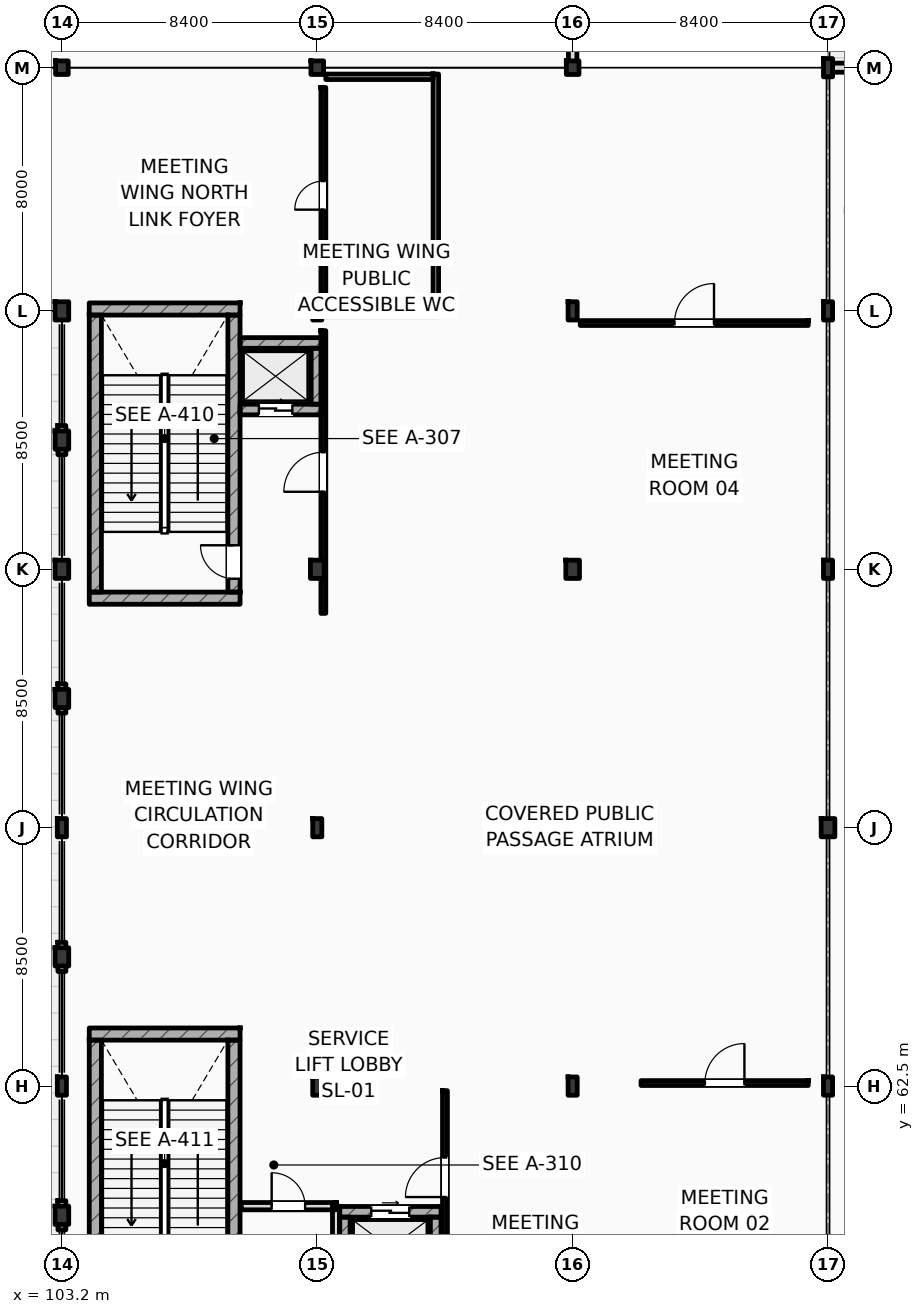
"""IFC4 building model, lengths in metres.
Left out: names, types, materials, properties, quantities, classifications, styles, units other than length and angle.
Written with IfcOpenShell. Run it as: python <this file> out.ifc"""

import sys

from ifc_helpers import new_model, si_unit, direction, frame, frame_2d, origin, origin_2d, place, context, subcontext, project, spatial, rectangle, i_section, extrude, element, fill, save


model = new_model("IFC4")
c1 = context("Model", 3, precision=1e-05, world=origin(), true_north=direction((0.0, 1.0)))
c2 = subcontext(c1, "Body", "Model", "MODEL_VIEW")
j1 = project(units=[si_unit("LENGTHUNIT", "METRE"), si_unit("PLANEANGLEUNIT", "RADIAN")], contexts=[c1])
p1 = place(None, origin())
s1 = spatial("IfcSite", under=j1, at=p1, CompositionType="ELEMENT")
p2 = place(p1, origin())
s2 = spatial("IfcBuilding", under=s1, at=p2, CompositionType="ELEMENT")
p3 = place(p2, origin())
s3 = spatial("IfcBuildingStorey", under=s2, at=p3, CompositionType="ELEMENT", Elevation=0.0)
for number, where, z_axis, x_axis in (
    (1, (103.2, 96.0, 0.0), (0.0, 0.0, 1.0), (1.0, 0.0, 0.0)),
    (2, (111.6, 96.0, 0.0), (0.0, 0.0, 1.0), (1.0, 0.0, 0.0)),
    (3, (120.0, 96.0, 0.0), (0.0, 0.0, 1.0), (1.0, 0.0, 0.0)),
):
    element("IfcColumn", number, at=place(p3, frame(where, z_axis=z_axis, x_axis=x_axis)), inside=s3, PredefinedType="COLUMN", context=c2, shape_type="SweptSolid", body=[
        extrude(i_section(OverallWidth=0.416, OverallDepth=0.446, WebThickness=0.036, FlangeThickness=0.048, FilletRadius=0.015, at=origin_2d()), origin(), (0.0, 0.0, 1.0), 6.0),
    ])
p4 = place(p3, frame((103.2, 88.0, 0.0), z_axis=(0.0, 0.0, 1.0), x_axis=(1.0, 0.0, 0.0)))
e4 = element("IfcColumn", 4, at=p4, inside=s3, PredefinedType="PILASTER", context=c2, shape_type="SweptSolid", body=[
    extrude(rectangle(XDim=0.45, YDim=0.6, at=origin_2d()), origin(), (0.0, 0.0, 1.0), 6.0),
])
for number, where, z_axis, x_axis in (
    (5, (103.2, 62.5, 0.0), (0.0, 0.0, 1.0), (1.0, 0.0, 0.0)),
    (6, (103.2, 71.0, 0.0), (0.0, 0.0, 1.0), (1.0, 0.0, 0.0)),
):
    element("IfcColumn", number, at=place(p3, frame(where, z_axis=z_axis, x_axis=x_axis)), inside=s3, PredefinedType="COLUMN", context=c2, shape_type="SweptSolid", body=[
        extrude(i_section(OverallWidth=0.3, OverallDepth=0.6, WebThickness=0.015, FlangeThickness=0.03, FilletRadius=0.027, at=origin_2d()), origin(), (0.0, 0.0, 1.0), 6.0),
    ])
p5 = place(p3, frame((103.2, 79.5, 0.0), z_axis=(0.0, 0.0, 1.0), x_axis=(1.0, 0.0, 0.0)))
e7 = element("IfcColumn", 7, at=p5, inside=s3, PredefinedType="PILASTER", context=c2, shape_type="SweptSolid", body=[
    extrude(rectangle(XDim=0.45, YDim=0.6, at=origin_2d()), origin(), (0.0, 0.0, 1.0), 6.0),
])
for number, where, z_axis, x_axis in (
    (8, (111.6, 62.5, 0.0), (0.0, 0.0, 1.0), (1.0, 0.0, 0.0)),
    (9, (111.6, 71.0, 0.0), (0.0, 0.0, 1.0), (1.0, 0.0, 0.0)),
):
    element("IfcColumn", number, at=place(p3, frame(where, z_axis=z_axis, x_axis=x_axis)), inside=s3, PredefinedType="COLUMN", context=c2, shape_type="SweptSolid", body=[
        extrude(i_section(OverallWidth=0.3, OverallDepth=0.6, WebThickness=0.015, FlangeThickness=0.03, FilletRadius=0.027, at=origin_2d()), origin(), (0.0, 0.0, 1.0), 6.0),
    ])
p6 = place(p3, frame((111.6, 79.5, 0.0), z_axis=(0.0, 0.0, 1.0), x_axis=(1.0, 0.0, 0.0)))
e10 = element("IfcColumn", 10, at=p6, inside=s3, PredefinedType="PILASTER", context=c2, shape_type="SweptSolid", body=[
    extrude(rectangle(XDim=0.45, YDim=0.6, at=origin_2d()), origin(), (0.0, 0.0, 1.0), 6.0),
])
for number, where, z_axis, x_axis in (
    (11, (111.6, 88.0, 0.0), (0.0, 0.0, 1.0), (1.0, 0.0, 0.0)),
    (12, (120.0, 62.5, 0.0), (0.0, 0.0, 1.0), (1.0, 0.0, 0.0)),
):
    element("IfcColumn", number, at=place(p3, frame(where, z_axis=z_axis, x_axis=x_axis)), inside=s3, PredefinedType="COLUMN", context=c2, shape_type="SweptSolid", body=[
        extrude(i_section(OverallWidth=0.3, OverallDepth=0.6, WebThickness=0.015, FlangeThickness=0.03, FilletRadius=0.027, at=origin_2d()), origin(), (0.0, 0.0, 1.0), 6.0),
    ])
p7 = place(p3, frame((120.0, 79.5, 0.0), z_axis=(0.0, 0.0, 1.0), x_axis=(1.0, 0.0, 0.0)))
e13 = element("IfcColumn", 13, at=p7, inside=s3, PredefinedType="PILASTER", context=c2, shape_type="SweptSolid", body=[
    extrude(rectangle(XDim=0.45, YDim=0.6, at=origin_2d()), origin(), (0.0, 0.0, 1.0), 6.0),
])
for number, where, z_axis, x_axis in (
    (14, (120.0, 88.0, 0.0), (0.0, 0.0, 1.0), (1.0, 0.0, 0.0)),
    (15, (128.4, 62.5, 0.0), (0.0, 0.0, 1.0), (1.0, 0.0, 0.0)),
):
    element("IfcColumn", number, at=place(p3, frame(where, z_axis=z_axis, x_axis=x_axis)), inside=s3, PredefinedType="COLUMN", context=c2, shape_type="SweptSolid", body=[
        extrude(i_section(OverallWidth=0.3, OverallDepth=0.6, WebThickness=0.015, FlangeThickness=0.03, FilletRadius=0.027, at=origin_2d()), origin(), (0.0, 0.0, 1.0), 6.0),
    ])
p8 = place(p3, frame((128.4, 71.0, 0.0), z_axis=(0.0, 0.0, 1.0), x_axis=(1.0, 0.0, 0.0)))
e16 = element("IfcColumn", 16, at=p8, inside=s3, PredefinedType="PILASTER", context=c2, shape_type="SweptSolid", body=[
    extrude(rectangle(XDim=0.45, YDim=0.6, at=origin_2d()), origin(), (0.0, 0.0, 1.0), 6.0),
])
for number, where, z_axis, x_axis in (
    (17, (128.4, 79.5, 0.0), (0.0, 0.0, 1.0), (1.0, 0.0, 0.0)),
    (18, (128.4, 88.0, 0.0), (0.0, 0.0, 1.0), (1.0, 0.0, 0.0)),
    (19, (128.4, 96.0, 0.0), (0.0, 0.0, 1.0), (1.0, 0.0, 0.0)),
):
    element("IfcColumn", number, at=place(p3, frame(where, z_axis=z_axis, x_axis=x_axis)), inside=s3, PredefinedType="COLUMN", context=c2, shape_type="SweptSolid", body=[
        extrude(i_section(OverallWidth=0.3, OverallDepth=0.6, WebThickness=0.015, FlangeThickness=0.03, FilletRadius=0.027, at=origin_2d()), origin(), (0.0, 0.0, 1.0), 6.0),
    ])
for number, where, z_axis, x_axis in (
    (20, (103.2, 58.25, 0.0), (0.0, 0.0, 1.0), (1.0, 0.0, 0.0)),
    (21, (103.2, 66.75, 0.0), (0.0, 0.0, 1.0), (1.0, 0.0, 0.0)),
    (22, (103.2, 75.25, 0.0), (0.0, 0.0, 1.0), (1.0, 0.0, 0.0)),
    (23, (103.2, 83.75, 0.0), (0.0, 0.0, 1.0), (1.0, 0.0, 0.0)),
):
    element("IfcColumn", number, at=place(p3, frame(where, z_axis=z_axis, x_axis=x_axis)), inside=s3, PredefinedType="PILASTER", context=c2, shape_type="SweptSolid", body=[
        extrude(rectangle(XDim=0.45, YDim=0.6, at=origin_2d()), origin(), (0.0, 0.0, 1.0), 6.0),
    ])
for number, where, z_axis, x_axis in (
    (24, (104.1, 88.062, 0.0), (0.0, 0.0, 1.0), (1.0, 0.0, 0.0)),
    (25, (104.1, 78.55, 0.0), (0.0, 0.0, 1.0), (1.0, 0.0, 0.0)),
):
    element("IfcWall", number, at=place(p3, frame(where, z_axis=z_axis, x_axis=x_axis)), inside=s3, PredefinedType="SHEAR", context=c2, shape_type="SweptSolid", body=[
        extrude(rectangle(XDim=4.96, YDim=0.4, at=frame_2d((2.48, 0.0))), origin(), (0.0, 0.0, 1.0), 6.0),
    ])
p9 = place(p3, frame((104.3, 78.75, 0.0), z_axis=(0.0, 0.0, 1.0), x_axis=(0.0, 1.0, 0.0)))
e26 = element("IfcWall", 26, at=p9, inside=s3, PredefinedType="SHEAR", context=c2, shape_type="SweptSolid", body=[
    extrude(rectangle(XDim=9.112, YDim=0.4, at=frame_2d((4.556, 0.0))), origin(), (0.0, 0.0, 1.0), 6.0),
])
p10 = place(p3, frame((108.86, 78.75, 0.0), z_axis=(0.0, 0.0, 1.0), x_axis=(0.0, 1.0, 0.0)))
e27 = element("IfcWall", 27, at=p10, inside=s3, PredefinedType="SHEAR", context=c2, shape_type="SweptSolid", body=[
    extrude(rectangle(XDim=9.112, YDim=0.4, at=frame_2d((4.556, 0.0))), origin(), (0.0, 0.0, 1.0), 6.0),
])
p11 = place(p10, frame((0.44, 0.0, 0.0)))
e28 = element("IfcOpeningElement", 28, at=p11, cuts=e27, PredefinedType="OPENING", context=c2, shape_type="SweptSolid", body=[
    extrude(rectangle(XDim=1.1, YDim=2.2, at=frame_2d((0.55, 1.1))), frame((0.0, 0.21, 0.0), z_axis=(0.0, -1.0, 0.0), x_axis=(1.0, 0.0, 0.0)), (0.0, 0.0, 1.0), 0.42),
])
p12 = place(p3, frame((104.1, 64.212, 0.0), z_axis=(0.0, 0.0, 1.0), x_axis=(1.0, 0.0, 0.0)))
e29 = element("IfcWall", 29, at=p12, inside=s3, PredefinedType="SHEAR", context=c2, shape_type="SweptSolid", body=[
    extrude(rectangle(XDim=4.96, YDim=0.4, at=frame_2d((2.48, 0.0))), origin(), (0.0, 0.0, 1.0), 6.0),
])
p13 = place(p3, frame((104.3, 54.9, 0.0), z_axis=(0.0, 0.0, 1.0), x_axis=(0.0, 1.0, 0.0)))
e30 = element("IfcWall", 30, at=p13, inside=s3, PredefinedType="SHEAR", context=c2, shape_type="SweptSolid", body=[
    extrude(rectangle(XDim=9.112, YDim=0.4, at=frame_2d((4.556, 0.0))), origin(), (0.0, 0.0, 1.0), 6.0),
])
p14 = place(p3, frame((108.86, 54.9, 0.0), z_axis=(0.0, 0.0, 1.0), x_axis=(0.0, 1.0, 0.0)))
e31 = element("IfcWall", 31, at=p14, inside=s3, PredefinedType="SHEAR", context=c2, shape_type="SweptSolid", body=[
    extrude(rectangle(XDim=9.112, YDim=0.4, at=frame_2d((4.556, 0.0))), origin(), (0.0, 0.0, 1.0), 6.0),
])
p15 = place(p14, frame((0.44, 0.0, 0.0)))
e32 = element("IfcOpeningElement", 32, at=p15, cuts=e31, PredefinedType="OPENING", context=c2, shape_type="SweptSolid", body=[
    extrude(rectangle(XDim=1.1, YDim=2.2, at=frame_2d((0.55, 1.1))), frame((0.0, 0.21, 0.0), z_axis=(0.0, -1.0, 0.0), x_axis=(1.0, 0.0, 0.0)), (0.0, 0.0, 1.0), 0.42),
])
p16 = place(p3, frame((128.4, 96.0, 0.0), z_axis=(0.0, 0.0, 1.0), x_axis=(1.0, 0.0, 0.0)))
e33 = element("IfcWall", 33, at=p16, inside=s3, PredefinedType="STANDARD", context=c2, shape_type="SweptSolid", body=[
    extrude(rectangle(XDim=9.0, YDim=0.3, at=frame_2d((4.5, 0.0))), origin(), (0.0, 0.0, 1.0), 5.09),
])
p17 = place(p16, frame((3.3, 0.0, 0.0)))
e34 = element("IfcOpeningElement", 34, at=p17, cuts=e33, PredefinedType="OPENING", context=c2, shape_type="SweptSolid", body=[
    extrude(rectangle(XDim=2.4, YDim=2.6, at=frame_2d((1.2, 1.3))), frame((0.0, 0.16, 0.0), z_axis=(0.0, -1.0, 0.0), x_axis=(1.0, 0.0, 0.0)), (0.0, 0.0, 1.0), 0.32),
])
for number, where, z_axis, x_axis in (
    (35, (103.2, 57.77, 0.0), (0.0, 0.0, 1.0), (0.0, 1.0, 0.0)),
    (36, (103.2, 66.27, 0.0), (0.0, 0.0, 1.0), (0.0, 1.0, 0.0)),
    (37, (103.2, 74.77, 0.0), (0.0, 0.0, 1.0), (0.0, 1.0, 0.0)),
    (38, (103.2, 83.27, 0.0), (0.0, 0.0, 1.0), (0.0, 1.0, 0.0)),
):
    element("IfcWall", number, at=place(p3, frame(where, z_axis=z_axis, x_axis=x_axis)), inside=s3, PredefinedType="STANDARD", context=c2, shape_type="SweptSolid", body=[
        extrude(rectangle(XDim=0.96, YDim=0.26, at=frame_2d((0.48, 0.0))), origin(), (0.0, 0.0, 1.0), 5.2),
    ])
p18 = place(p3, frame((120.0, 96.0, 0.0), z_axis=(0.0, 0.0, 1.0), x_axis=(0.0, 1.0, 0.0)))
e39 = element("IfcWall", 39, at=p18, inside=s3, PredefinedType="STANDARD", context=c2, shape_type="SweptSolid", body=[
    extrude(rectangle(XDim=22.0, YDim=0.28, at=frame_2d((11.0, 0.0))), origin(), (0.0, 0.0, 1.0), 5.24),
])
p19 = place(p3, frame((109.06, 86.945, 0.0), z_axis=(0.0, 0.0, 1.0), x_axis=(1.0, 0.0, 0.0)))
e40 = element("IfcWall", 40, at=p19, inside=s3, PredefinedType="SHEAR", context=c2, shape_type="SweptSolid", body=[
    extrude(rectangle(XDim=2.69, YDim=0.35, at=frame_2d((1.345, 0.0))), origin(), (0.0, 0.0, 1.0), 5.7),
])
p20 = place(p3, frame((109.06, 84.755, 0.0), z_axis=(0.0, 0.0, 1.0), x_axis=(1.0, 0.0, 0.0)))
e41 = element("IfcWall", 41, at=p20, inside=s3, PredefinedType="SHEAR", context=c2, shape_type="SweptSolid", body=[
    extrude(rectangle(XDim=2.69, YDim=0.35, at=frame_2d((1.345, 0.0))), origin(), (0.0, 0.0, 1.0), 5.7),
])
p21 = place(p20, frame((0.62, 0.0, 0.0)))
e42 = element("IfcOpeningElement", 42, at=p21, cuts=e41, PredefinedType="OPENING", context=c2, shape_type="SweptSolid", body=[
    extrude(rectangle(XDim=1.1, YDim=2.2, at=frame_2d((0.55, 1.1))), frame((0.0, 0.185, 0.0), z_axis=(0.0, -1.0, 0.0), x_axis=(1.0, 0.0, 0.0)), (0.0, 0.0, 1.0), 0.37),
])
p22 = place(p3, frame((111.575, 84.93, 0.0), z_axis=(0.0, 0.0, 1.0), x_axis=(0.0, 1.0, 0.0)))
e43 = element("IfcWall", 43, at=p22, inside=s3, PredefinedType="SHEAR", context=c2, shape_type="SweptSolid", body=[
    extrude(rectangle(XDim=1.84, YDim=0.35, at=frame_2d((0.92, 0.0))), origin(), (0.0, 0.0, 1.0), 5.2),
])
p23 = place(p3, frame((112.33, 58.365, 0.0), z_axis=(0.0, 0.0, 1.0), x_axis=(1.0, 0.0, 0.0)))
e44 = element("IfcWall", 44, at=p23, inside=s3, PredefinedType="SHEAR", context=c2, shape_type="SweptSolid", body=[
    extrude(rectangle(XDim=3.34, YDim=0.35, at=frame_2d((1.67, 0.0))), origin(), (0.0, 0.0, 1.0), 5.7),
])
p24 = place(p23, frame((1.045, 0.0, 0.0)))
e45 = element("IfcOpeningElement", 45, at=p24, cuts=e44, PredefinedType="OPENING", context=c2, shape_type="SweptSolid", body=[
    extrude(rectangle(XDim=1.25, YDim=2.25, at=frame_2d((0.625, 1.125))), frame((0.0, 0.185, 0.0), z_axis=(0.0, -1.0, 0.0), x_axis=(1.0, 0.0, 0.0)), (0.0, 0.0, 1.0), 0.37),
])
for number, where, z_axis, x_axis in (
    (46, (112.505, 56.15, 0.0), (0.0, 0.0, 1.0), (0.0, 1.0, 0.0)),
    (47, (115.495, 56.15, 0.0), (0.0, 0.0, 1.0), (0.0, 1.0, 0.0)),
):
    element("IfcWall", number, at=place(p3, frame(where, z_axis=z_axis, x_axis=x_axis)), inside=s3, PredefinedType="SHEAR", context=c2, shape_type="SweptSolid", body=[
        extrude(rectangle(XDim=2.04, YDim=0.35, at=frame_2d((1.02, 0.0))), origin(), (0.0, 0.0, 1.0), 5.7),
    ])
p25 = place(p3, frame((115.8, 54.65, 0.0), z_axis=(0.0, 0.0, 1.0), x_axis=(0.0, 1.0, 0.0)))
e48 = element("IfcWall", 48, at=p25, inside=s3, PredefinedType="PARTITIONING", context=c2, shape_type="SweptSolid", body=[
    extrude(rectangle(XDim=7.7, YDim=0.16, at=frame_2d((3.85, 0.0))), origin(), (0.0, 0.0, 1.0), 5.7),
])
p26 = place(p25, frame((4.2, 0.0, 0.0)))
e49 = element("IfcOpeningElement", 49, at=p26, cuts=e48, PredefinedType="OPENING", context=c2, shape_type="SweptSolid", body=[
    extrude(rectangle(XDim=1.3, YDim=2.2, at=frame_2d((0.65, 1.1))), frame((0.0, 0.09, 0.0), z_axis=(0.0, -1.0, 0.0), x_axis=(1.0, 0.0, 0.0)), (0.0, 0.0, 1.0), 0.18),
])
p27 = place(p3, frame((122.25, 62.6, 0.0), z_axis=(0.0, 0.0, 1.0), x_axis=(1.0, 0.0, 0.0)))
e50 = element("IfcWall", 50, at=p27, inside=s3, PredefinedType="PARTITIONING", context=c2, shape_type="SweptSolid", body=[
    extrude(rectangle(XDim=5.5, YDim=0.16, at=frame_2d((2.75, 0.0))), origin(), (0.0, 0.0, 1.0), 5.14),
])
p28 = place(p27, frame((2.1, 0.0, 0.0)))
e51 = element("IfcOpeningElement", 51, at=p28, cuts=e50, PredefinedType="OPENING", context=c2, shape_type="SweptSolid", body=[
    extrude(rectangle(XDim=1.3, YDim=2.2, at=frame_2d((0.65, 1.1))), frame((0.0, 0.09, 0.0), z_axis=(0.0, -1.0, 0.0), x_axis=(1.0, 0.0, 0.0)), (0.0, 0.0, 1.0), 0.18),
])
p29 = place(p3, frame((111.8, 78.05, 0.0), z_axis=(0.0, 0.0, 1.0), x_axis=(0.0, 1.0, 0.0)))
e52 = element("IfcWall", 52, at=p29, inside=s3, PredefinedType="PARTITIONING", context=c2, shape_type="SweptSolid", body=[
    extrude(rectangle(XDim=9.3, YDim=0.16, at=frame_2d((4.65, 0.0))), origin(), (0.0, 0.0, 1.0), 5.2),
])
p30 = place(p29, frame((4.0, 0.0, 0.0)))
e53 = element("IfcOpeningElement", 53, at=p30, cuts=e52, PredefinedType="OPENING", context=c2, shape_type="SweptSolid", body=[
    extrude(rectangle(XDim=1.3, YDim=2.2, at=frame_2d((0.65, 1.1))), frame((0.0, 0.09, 0.0), z_axis=(0.0, -1.0, 0.0), x_axis=(1.0, 0.0, 0.0)), (0.0, 0.0, 1.0), 0.18),
])
p31 = place(p3, frame((120.25, 87.6, 0.0), z_axis=(0.0, 0.0, 1.0), x_axis=(1.0, 0.0, 0.0)))
e54 = element("IfcWall", 54, at=p31, inside=s3, PredefinedType="PARTITIONING", context=c2, shape_type="SweptSolid", body=[
    extrude(rectangle(XDim=7.5, YDim=0.16, at=frame_2d((3.75, 0.0))), origin(), (0.0, 0.0, 1.0), 5.7),
])
p32 = place(p31, frame((3.1, 0.0, 0.0)))
e55 = element("IfcOpeningElement", 55, at=p32, cuts=e54, PredefinedType="OPENING", context=c2, shape_type="SweptSolid", body=[
    extrude(rectangle(XDim=1.3, YDim=2.2, at=frame_2d((0.65, 1.1))), frame((0.0, 0.09, 0.0), z_axis=(0.0, -1.0, 0.0), x_axis=(1.0, 0.0, 0.0)), (0.0, 0.0, 1.0), 0.18),
])
p33 = place(p3, frame((111.8, 88.25, 0.0), z_axis=(0.0, 0.0, 1.0), x_axis=(0.0, 1.0, 0.0)))
e56 = element("IfcWall", 56, at=p33, inside=s3, PredefinedType="PARTITIONING", context=c2, shape_type="SweptSolid", body=[
    extrude(rectangle(XDim=7.1, YDim=0.16, at=frame_2d((3.55, 0.0))), origin(), (0.0, 0.0, 1.0), 5.24),
])
p34 = place(p33, frame((3.08, 0.0, 0.0)))
e57 = element("IfcOpeningElement", 57, at=p34, cuts=e56, PredefinedType="OPENING", context=c2, shape_type="SweptSolid", body=[
    extrude(rectangle(XDim=0.94, YDim=2.15, at=frame_2d((0.47, 1.075))), frame((0.0, 0.09, 0.0), z_axis=(0.0, -1.0, 0.0), x_axis=(1.0, 0.0, 0.0)), (0.0, 0.0, 1.0), 0.18),
])
p35 = place(p3, frame((111.88, 87.9, 0.0), z_axis=(0.0, 0.0, 1.0), x_axis=(1.0, 0.0, 0.0)))
e58 = element("IfcWall", 58, at=p35, inside=s3, PredefinedType="PARTITIONING", context=c2, shape_type="SweptSolid", body=[
    extrude(rectangle(XDim=3.53, YDim=0.18, at=frame_2d((1.765, 0.0))), origin(), (0.0, 0.0, 1.0), 5.14),
])
p36 = place(p3, frame((115.5, 87.81, 0.0), z_axis=(0.0, 0.0, 1.0), x_axis=(0.0, 1.0, 0.0)))
e59 = element("IfcWall", 59, at=p36, inside=s3, PredefinedType="PARTITIONING", context=c2, shape_type="SweptSolid", body=[
    extrude(rectangle(XDim=7.98, YDim=0.18, at=frame_2d((3.99, 0.0))), origin(), (0.0, 0.0, 1.0), 5.7),
])
p37 = place(p3, frame((111.88, 95.7, 0.0), z_axis=(0.0, 0.0, 1.0), x_axis=(1.0, 0.0, 0.0)))
e60 = element("IfcWall", 60, at=p37, inside=s3, PredefinedType="PARTITIONING", context=c2, shape_type="SweptSolid", body=[
    extrude(rectangle(XDim=3.53, YDim=0.18, at=frame_2d((1.765, 0.0))), origin(), (0.0, 0.0, 1.0), 5.7),
])
p38 = place(p3, frame((112.22, 54.22, 0.0), z_axis=(0.0, 0.0, 1.0), x_axis=(0.0, 1.0, 0.0)))
e61 = element("IfcWall", 61, at=p38, inside=s3, PredefinedType="STANDARD", context=c2, shape_type="SweptSolid", body=[
    extrude(rectangle(XDim=4.33, YDim=0.24, at=frame_2d((2.165, 0.0))), origin(), (0.0, 0.0, 1.0), 5.7),
])
p39 = place(p3, frame((109.1, 58.55, 0.0), z_axis=(0.0, 0.0, 1.0), x_axis=(1.0, 0.0, 0.0)))
e62 = element("IfcWall", 62, at=p39, inside=s3, PredefinedType="STANDARD", context=c2, shape_type="SweptSolid", body=[
    extrude(rectangle(XDim=3.12, YDim=0.24, at=frame_2d((1.56, 0.0))), origin(), (0.0, 0.0, 1.0), 5.7),
])
p40 = place(p39, frame((1.0, 0.0, 0.0)))
e63 = element("IfcOpeningElement", 63, at=p40, cuts=e62, PredefinedType="OPENING", context=c2, shape_type="SweptSolid", body=[
    extrude(rectangle(XDim=1.1, YDim=2.2, at=frame_2d((0.55, 1.1))), frame((0.0, 0.13, 0.0), z_axis=(0.0, -1.0, 0.0), x_axis=(1.0, 0.0, 0.0)), (0.0, 0.0, 1.0), 0.26),
])
p41 = place(p11, origin())
e64 = element("IfcDoor", 64, at=p41, inside=s3, OperationType="SINGLE_SWING_RIGHT", PredefinedType="DOOR", context=c2, shape_type="SweptSolid", body=[
    extrude(rectangle(XDim=1.1, YDim=2.2, at=frame_2d((0.55, 1.1))), frame((0.0, 0.025, 0.0), z_axis=(0.0, -1.0, 0.0), x_axis=(1.0, 0.0, 0.0)), (0.0, 0.0, 1.0), 0.05),
])
fill(e28, e64)
p42 = place(p21, origin())
e65 = element("IfcDoor", 65, at=p42, inside=s3, OperationType="SLIDING_TO_LEFT", PredefinedType="DOOR", context=c2, shape_type="SweptSolid", body=[
    extrude(rectangle(XDim=1.1, YDim=2.2, at=frame_2d((0.55, 1.1))), frame((0.0, 0.025, 0.0), z_axis=(0.0, -1.0, 0.0), x_axis=(1.0, 0.0, 0.0)), (0.0, 0.0, 1.0), 0.05),
])
fill(e42, e65)
p43 = place(p24, origin())
e66 = element("IfcDoor", 66, at=p43, inside=s3, OperationType="SLIDING_TO_LEFT", PredefinedType="DOOR", context=c2, shape_type="SweptSolid", body=[
    extrude(rectangle(XDim=1.25, YDim=2.25, at=frame_2d((0.625, 1.125))), frame((0.0, 0.025, 0.0), z_axis=(0.0, -1.0, 0.0), x_axis=(1.0, 0.0, 0.0)), (0.0, 0.0, 1.0), 0.05),
])
fill(e45, e66)
p44 = place(p26, origin())
e67 = element("IfcDoor", 67, at=p44, inside=s3, OperationType="SINGLE_SWING_LEFT", PredefinedType="DOOR", context=c2, shape_type="SweptSolid", body=[
    extrude(rectangle(XDim=1.3, YDim=2.2, at=frame_2d((0.65, 1.1))), frame((0.0, 0.025, 0.0), z_axis=(0.0, -1.0, 0.0), x_axis=(1.0, 0.0, 0.0)), (0.0, 0.0, 1.0), 0.05),
])
fill(e49, e67)
p45 = place(p28, origin())
e68 = element("IfcDoor", 68, at=p45, inside=s3, OperationType="SINGLE_SWING_RIGHT", PredefinedType="DOOR", context=c2, shape_type="SweptSolid", body=[
    extrude(rectangle(XDim=1.3, YDim=2.2, at=frame_2d((0.65, 1.1))), frame((0.0, 0.025, 0.0), z_axis=(0.0, -1.0, 0.0), x_axis=(1.0, 0.0, 0.0)), (0.0, 0.0, 1.0), 0.05),
])
fill(e51, e68)
p46 = place(p30, origin())
e69 = element("IfcDoor", 69, at=p46, inside=s3, OperationType="SINGLE_SWING_LEFT", PredefinedType="DOOR", context=c2, shape_type="SweptSolid", body=[
    extrude(rectangle(XDim=1.3, YDim=2.2, at=frame_2d((0.65, 1.1))), frame((0.0, 0.025, 0.0), z_axis=(0.0, -1.0, 0.0), x_axis=(1.0, 0.0, 0.0)), (0.0, 0.0, 1.0), 0.05),
])
fill(e53, e69)
p47 = place(p32, origin())
e70 = element("IfcDoor", 70, at=p47, inside=s3, OperationType="SINGLE_SWING_RIGHT", PredefinedType="DOOR", context=c2, shape_type="SweptSolid", body=[
    extrude(rectangle(XDim=1.3, YDim=2.2, at=frame_2d((0.65, 1.1))), frame((0.0, 0.025, 0.0), z_axis=(0.0, -1.0, 0.0), x_axis=(1.0, 0.0, 0.0)), (0.0, 0.0, 1.0), 0.05),
])
fill(e55, e70)
p48 = place(p34, origin())
e71 = element("IfcDoor", 71, at=p48, inside=s3, OperationType="SINGLE_SWING_LEFT", PredefinedType="DOOR", context=c2, shape_type="SweptSolid", body=[
    extrude(rectangle(XDim=0.94, YDim=2.15, at=frame_2d((0.47, 1.075))), frame((0.0, 0.025, 0.0), z_axis=(0.0, -1.0, 0.0), x_axis=(1.0, 0.0, 0.0)), (0.0, 0.0, 1.0), 0.05),
])
fill(e57, e71)
p49 = place(p40, origin())
e72 = element("IfcDoor", 72, at=p49, inside=s3, OperationType="SINGLE_SWING_LEFT", PredefinedType="DOOR", context=c2, shape_type="SweptSolid", body=[
    extrude(rectangle(XDim=1.1, YDim=2.2, at=frame_2d((0.55, 1.1))), frame((0.0, 0.025, 0.0), z_axis=(0.0, -1.0, 0.0), x_axis=(1.0, 0.0, 0.0)), (0.0, 0.0, 1.0), 0.05),
])
fill(e63, e72)
save(model, sys.argv[1])
